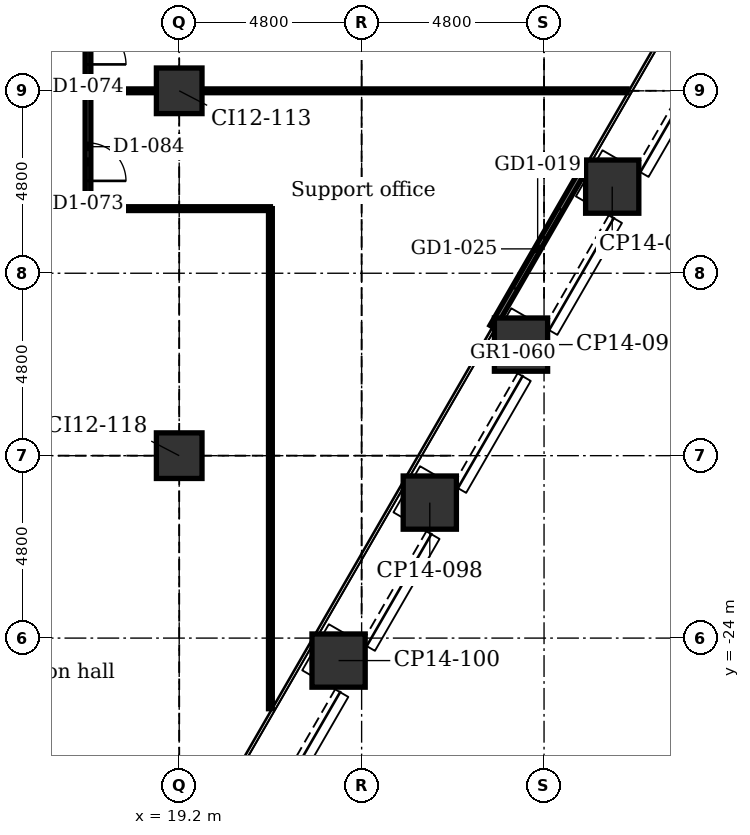
"""IFC4 building model, lengths in metres.
Left out: names, types, materials, properties, quantities, classifications, styles, units other than length and angle.
Written with IfcOpenShell. Run it as: python <this file> out.ifc"""

import sys

from ifc_helpers import new_model, si_unit, direction, frame, frame_2d, origin, origin_2d, place, context, subcontext, project, spatial, rectangle, extrude, element, fill, save


model = new_model("IFC4")
c1 = context("Model", 3, precision=1e-05, world=origin(), true_north=direction((0.0, 1.0)))
c2 = subcontext(c1, "Body", "Model", "MODEL_VIEW")
j1 = project(units=[si_unit("LENGTHUNIT", "METRE"), si_unit("PLANEANGLEUNIT", "RADIAN")], contexts=[c1])
p1 = place(None, origin())
s1 = spatial("IfcSite", under=j1, at=p1, CompositionType="ELEMENT")
p2 = place(p1, origin())
s2 = spatial("IfcBuilding", under=s1, at=p2, CompositionType="ELEMENT")
p3 = place(p2, frame((0.0, 0.0, 22.4)))
s3 = spatial("IfcBuildingStorey", under=s2, at=p3, CompositionType="ELEMENT", Elevation=22.4)
for number, where, z_axis, x_axis in (
    (1, (32.994, -7.964, -0.25), (0.0, 0.0, 1.0), (0.5, 0.866, 0.0)),
    (2, (30.594, -12.121, -0.25), (0.0, 0.0, 1.0), (0.5, 0.866, 0.0)),
    (3, (28.194, -16.278, -0.25), (0.0, 0.0, 1.0), (0.5, 0.866, 0.0)),
    (4, (25.794, -20.435, -0.25), (0.0, 0.0, 1.0), (0.5, 0.866, 0.0)),
    (5, (23.394, -24.592, -0.25), (0.0, 0.0, 1.0), (0.5, 0.866, 0.0)),
):
    element("IfcColumn", number, at=place(p3, frame(where, z_axis=z_axis, x_axis=x_axis)), inside=s3, PredefinedType="COLUMN", context=c2, shape_type="SweptSolid", body=[
        extrude(rectangle(XDim=1.4, YDim=1.4, at=origin_2d()), origin(), (0.0, 0.0, 1.0), 5.5),
    ])
for number, where, z_axis, x_axis in (
    (6, (19.2, -19.2, -0.25), (0.0, 0.0, 1.0), (1.0, 0.0, 0.0)),
    (7, (19.2, -9.6, -0.25), (0.0, 0.0, 1.0), (1.0, 0.0, 0.0)),
):
    element("IfcColumn", number, at=place(p3, frame(where, z_axis=z_axis, x_axis=x_axis)), inside=s3, PredefinedType="COLUMN", context=c2, shape_type="SweptSolid", body=[
        extrude(rectangle(XDim=1.2, YDim=1.2, at=origin_2d()), origin(), (0.0, 0.0, 1.0), 5.5),
    ])
p4 = place(p3, frame((29.817, -11.707, 0.0), z_axis=(0.0, 0.0, 1.0), x_axis=(-0.499978080042, -0.866038058908, 0.0)))
e8 = element("IfcWall", 8, at=p4, inside=s3, PredefinedType="PARTITIONING", context=c2, shape_type="SweptSolid", body=[
    extrude(rectangle(XDim=4.74, YDim=0.16, at=frame_2d((2.37, 0.0))), origin(), (0.0, 0.0, 1.0), 5.25),
])
p5 = place(p4, frame((1.17, 0.0, 0.0)))
e9 = element("IfcOpeningElement", 9, at=p5, cuts=e8, PredefinedType="OPENING", context=c2, shape_type="SweptSolid", body=[
    extrude(rectangle(XDim=2.4, YDim=2.4, at=frame_2d((1.2, 1.2))), frame((0.0, 0.09, 0.0), z_axis=(0.0, -1.0, 0.0), x_axis=(1.0, 0.0, 0.0)), (0.0, 0.0, 1.0), 0.18),
])
p6 = place(p3, frame((21.6, -25.858, 0.0), z_axis=(0.0, 0.0, 1.0), x_axis=(0.0, 1.0, 0.0)))
e10 = element("IfcWall", 10, at=p6, inside=s3, PredefinedType="PARTITIONING", context=c2, shape_type="SweptSolid", body=[
    extrude(rectangle(XDim=13.158, YDim=0.1, at=frame_2d((6.579, 0.0))), origin(), (0.0, 0.0, 1.0), 5.25),
])
p7 = place(p3, frame((16.8, -12.7, 0.0), z_axis=(0.0, 0.0, 1.0), x_axis=(0.0, 1.0, 0.0)))
e11 = element("IfcWall", 11, at=p7, inside=s3, PredefinedType="PARTITIONING", context=c2, shape_type="SweptSolid", body=[
    extrude(rectangle(XDim=8.75, YDim=0.15, at=frame_2d((4.375, 0.0))), origin(), (0.0, 0.0, 1.0), 5.25),
])
p8 = place(p7, frame((0.73, 0.0, 0.0)))
e12 = element("IfcOpeningElement", 12, at=p8, cuts=e11, PredefinedType="OPENING", context=c2, shape_type="SweptSolid", body=[
    extrude(rectangle(XDim=1.0, YDim=2.1, at=frame_2d((0.5, 1.05))), frame((0.0, 0.085, 0.0), z_axis=(0.0, -1.0, 0.0), x_axis=(1.0, 0.0, 0.0)), (0.0, 0.0, 1.0), 0.17),
])
p9 = place(p7, frame((3.795, 0.0, 0.0)))
e13 = element("IfcOpeningElement", 13, at=p9, cuts=e11, PredefinedType="OPENING", context=c2, shape_type="SweptSolid", body=[
    extrude(rectangle(XDim=1.0, YDim=2.1, at=frame_2d((0.5, 1.05))), frame((0.0, 0.085, 0.0), z_axis=(0.0, -1.0, 0.0), x_axis=(1.0, 0.0, 0.0)), (0.0, 0.0, 1.0), 0.17),
])
p10 = place(p7, frame((6.475, 0.0, 0.0)))
e14 = element("IfcOpeningElement", 14, at=p10, cuts=e11, PredefinedType="OPENING", context=c2, shape_type="SweptSolid", body=[
    extrude(rectangle(XDim=1.8, YDim=2.1, at=frame_2d((0.9, 1.05))), frame((0.0, 0.085, 0.0), z_axis=(0.0, -1.0, 0.0), x_axis=(1.0, 0.0, 0.0)), (0.0, 0.0, 1.0), 0.17),
])
p11 = place(p3, frame((16.8, -12.7, 0.0), z_axis=(0.0, 0.0, 1.0), x_axis=(1.0, 0.0, 0.0)))
e15 = element("IfcWall", 15, at=p11, inside=s3, PredefinedType="PARTITIONING", context=c2, shape_type="SweptSolid", body=[
    extrude(rectangle(XDim=4.8, YDim=0.1, at=frame_2d((2.4, 0.0))), origin(), (0.0, 0.0, 1.0), 5.25),
])
p12 = place(p3, frame((-21.6, -12.7, 0.0), z_axis=(0.0, 0.0, 1.0), x_axis=(1.0, 0.0, 0.0)))
e16 = element("IfcWall", 16, at=p12, inside=s3, PredefinedType="PARTITIONING", context=c2, shape_type="SweptSolid", body=[
    extrude(rectangle(XDim=38.4, YDim=0.15, at=frame_2d((19.2, 0.0))), origin(), (0.0, 0.0, 1.0), 5.25),
])
p13 = place(p12, frame((5.425, 0.0, 0.0)))
e17 = element("IfcOpeningElement", 17, at=p13, cuts=e16, PredefinedType="OPENING", context=c2, shape_type="SweptSolid", body=[
    extrude(rectangle(XDim=1.0, YDim=2.1, at=frame_2d((0.5, 1.05))), frame((0.0, 0.085, 0.0), z_axis=(0.0, -1.0, 0.0), x_axis=(1.0, 0.0, 0.0)), (0.0, 0.0, 1.0), 0.17),
])
p14 = place(p12, frame((9.1, 0.0, 0.0)))
e18 = element("IfcOpeningElement", 18, at=p14, cuts=e16, PredefinedType="OPENING", context=c2, shape_type="SweptSolid", body=[
    extrude(rectangle(XDim=1.0, YDim=2.1, at=frame_2d((0.5, 1.05))), frame((0.0, 0.085, 0.0), z_axis=(0.0, -1.0, 0.0), x_axis=(1.0, 0.0, 0.0)), (0.0, 0.0, 1.0), 0.17),
])
p15 = place(p12, frame((15.9, 0.0, 0.0)))
e19 = element("IfcOpeningElement", 19, at=p15, cuts=e16, PredefinedType="OPENING", context=c2, shape_type="SweptSolid", body=[
    extrude(rectangle(XDim=1.8, YDim=2.1, at=frame_2d((0.9, 1.05))), frame((0.0, 0.085, 0.0), z_axis=(0.0, -1.0, 0.0), x_axis=(1.0, 0.0, 0.0)), (0.0, 0.0, 1.0), 0.17),
])
p16 = place(p12, frame((27.915, 0.0, 0.0)))
e20 = element("IfcOpeningElement", 20, at=p16, cuts=e16, PredefinedType="OPENING", context=c2, shape_type="SweptSolid", body=[
    extrude(rectangle(XDim=1.8, YDim=2.1, at=frame_2d((0.9, 1.05))), frame((0.0, 0.085, 0.0), z_axis=(0.0, -1.0, 0.0), x_axis=(1.0, 0.0, 0.0)), (0.0, 0.0, 1.0), 0.17),
])
p17 = place(p12, frame((35.025, 0.0, 0.0)))
e21 = element("IfcOpeningElement", 21, at=p17, cuts=e16, PredefinedType="OPENING", context=c2, shape_type="SweptSolid", body=[
    extrude(rectangle(XDim=1.8, YDim=2.1, at=frame_2d((0.9, 1.05))), frame((0.0, 0.085, 0.0), z_axis=(0.0, -1.0, 0.0), x_axis=(1.0, 0.0, 0.0)), (0.0, 0.0, 1.0), 0.17),
])
p18 = place(p12, frame((13.0, 0.0, 0.9)))
e22 = element("IfcOpeningElement", 22, at=p18, cuts=e16, PredefinedType="OPENING", context=c2, shape_type="SweptSolid", body=[
    extrude(rectangle(XDim=1.8, YDim=1.5, at=frame_2d((0.9, 0.75))), frame((0.0, 0.085, 0.0), z_axis=(0.0, -1.0, 0.0), x_axis=(1.0, 0.0, 0.0)), (0.0, 0.0, 1.0), 0.17),
])
p19 = place(p3, frame((16.8, -9.6, 0.0), z_axis=(0.0, 0.0, 1.0), x_axis=(1.0, 0.0, 0.0)))
e23 = element("IfcWall", 23, at=p19, inside=s3, PredefinedType="PARTITIONING", context=c2, shape_type="SweptSolid", body=[
    extrude(rectangle(XDim=1.8, YDim=0.1, at=frame_2d((0.9, 0.0))), origin(), (0.0, 0.0, 1.0), 4.642),
])
p20 = place(p3, frame((19.8, -9.6, 0.0), z_axis=(0.0, 0.0, 1.0), x_axis=(1.0, 0.0, 0.0)))
e24 = element("IfcWall", 24, at=p20, inside=s3, PredefinedType="PARTITIONING", context=c2, shape_type="SweptSolid", body=[
    extrude(rectangle(XDim=11.187, YDim=0.1, at=frame_2d((5.593, 0.0))), origin(), (0.0, 0.0, 1.0), 4.488),
])
p21 = place(p5, origin())
e25 = element("IfcDoor", 25, at=p21, inside=s3, OperationType="DOUBLE_DOOR_SLIDING", PredefinedType="DOOR", context=c2, shape_type="SweptSolid", body=[
    extrude(rectangle(XDim=2.4, YDim=2.4, at=frame_2d((1.2, 1.2))), frame((0.0, 0.025, 0.0), z_axis=(0.0, -1.0, 0.0), x_axis=(1.0, 0.0, 0.0)), (0.0, 0.0, 1.0), 0.05),
])
fill(e9, e25)
p22 = place(p8, frame((1.0, 0.0, 0.0), z_axis=(0.0, 0.0, 1.0), x_axis=(-1.0, 0.0, 0.0)))
e26 = element("IfcDoor", 26, at=p22, inside=s3, OperationType="SINGLE_SWING_LEFT", PredefinedType="DOOR", context=c2, shape_type="SweptSolid", body=[
    extrude(rectangle(XDim=1.0, YDim=2.1, at=frame_2d((0.5, 1.05))), frame((0.0, 0.025, 0.0), z_axis=(0.0, -1.0, 0.0), x_axis=(1.0, 0.0, 0.0)), (0.0, 0.0, 1.0), 0.05),
])
fill(e12, e26)
p23 = place(p9, frame((1.0, 0.0, 0.0), z_axis=(0.0, 0.0, 1.0), x_axis=(-1.0, 0.0, 0.0)))
e27 = element("IfcDoor", 27, at=p23, inside=s3, OperationType="SINGLE_SWING_LEFT", PredefinedType="DOOR", context=c2, shape_type="SweptSolid", body=[
    extrude(rectangle(XDim=1.0, YDim=2.1, at=frame_2d((0.5, 1.05))), frame((0.0, 0.025, 0.0), z_axis=(0.0, -1.0, 0.0), x_axis=(1.0, 0.0, 0.0)), (0.0, 0.0, 1.0), 0.05),
])
fill(e13, e27)
save(model, sys.argv[1])
